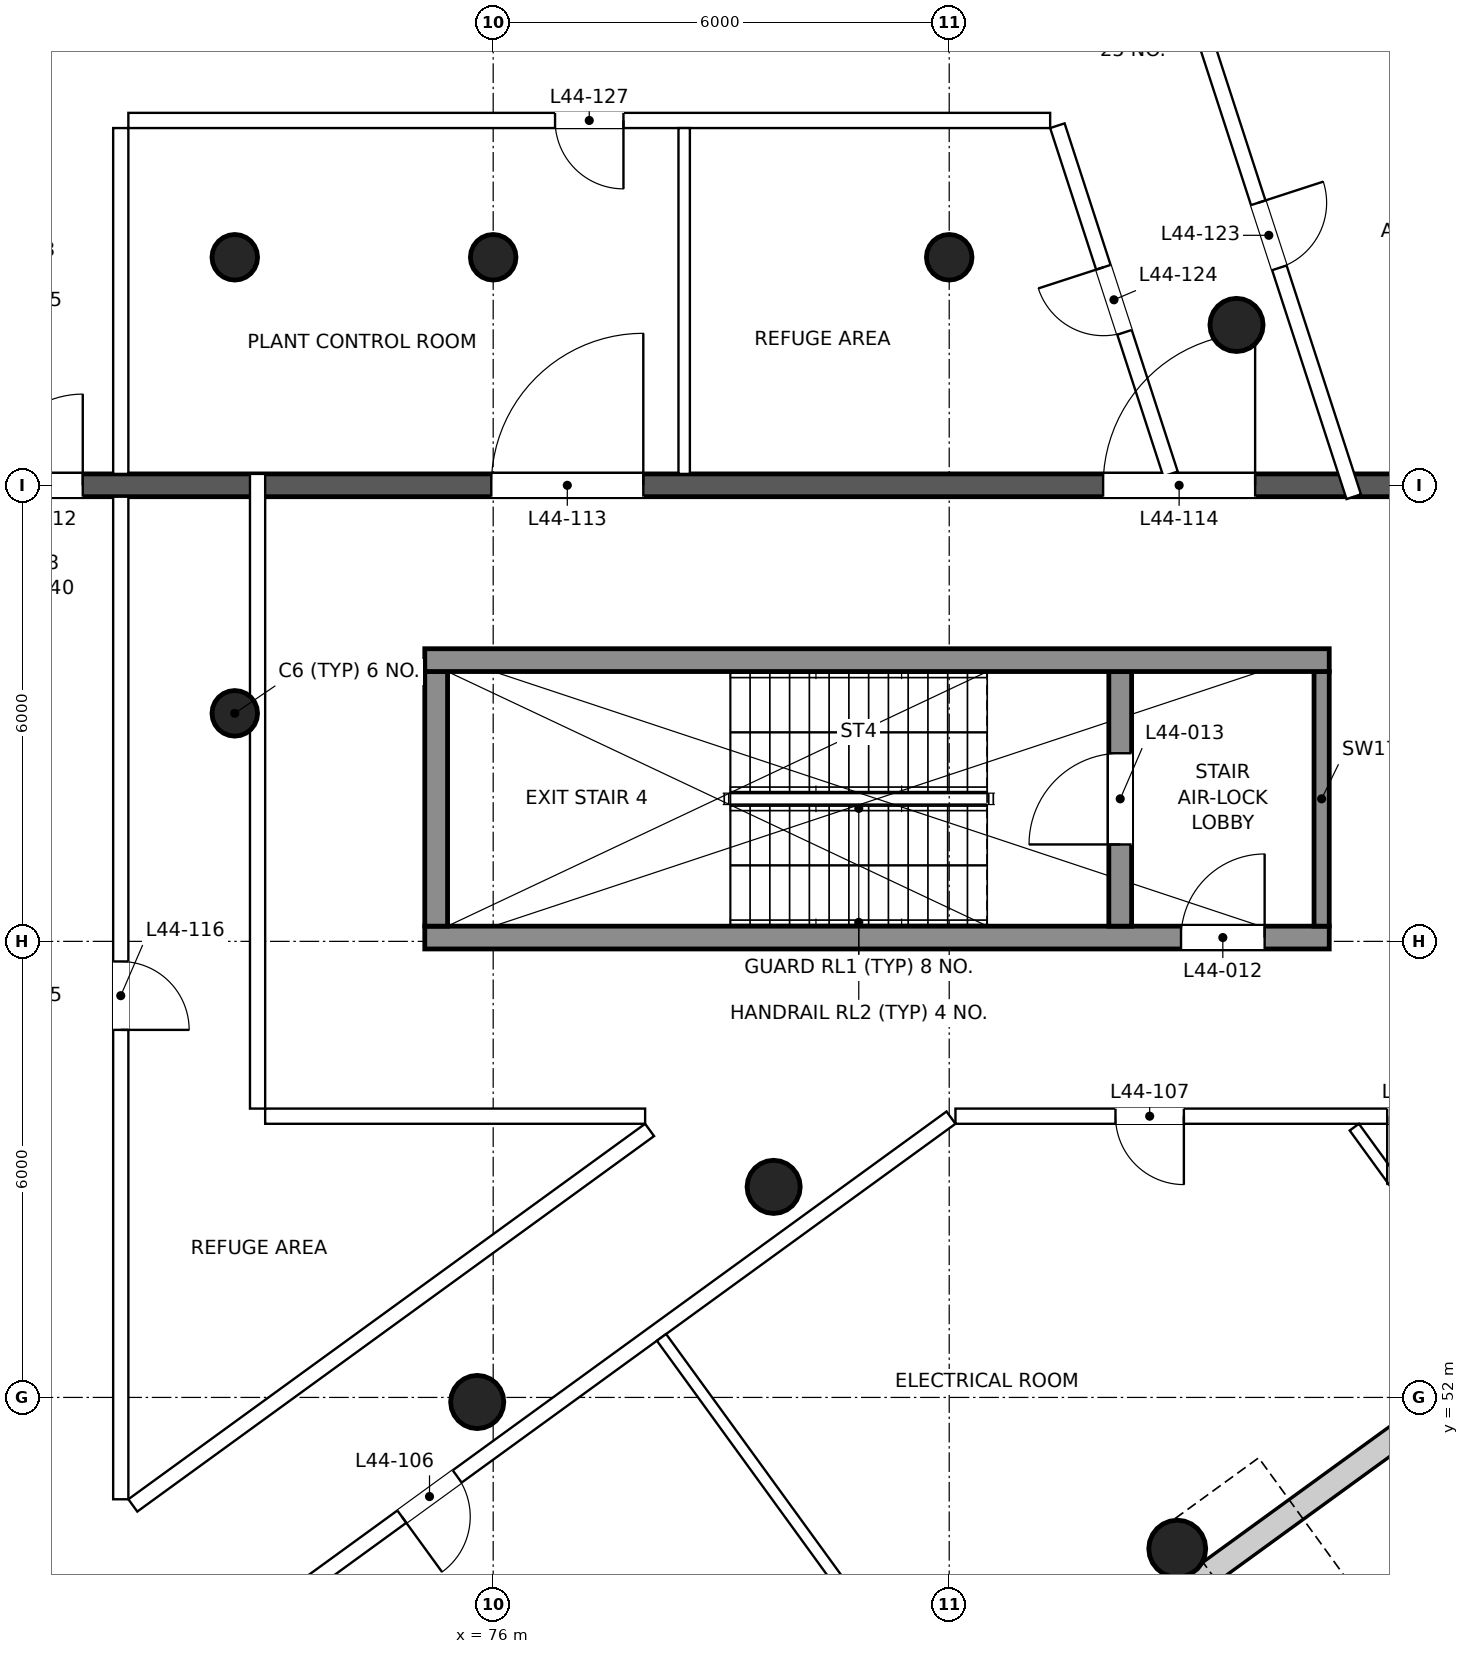
"""IFC4 building model, lengths in metres.
Left out: names, types, materials, properties, quantities, classifications, styles, units other than length and angle.
Written with IfcOpenShell. Run it as: python <this file> out.ifc"""

import sys

from ifc_helpers import new_model, si_unit, direction, frame, frame_2d, origin, origin_2d, place, context, subcontext, project, spatial, rectangle, circle, extrude, element, fill, save


model = new_model("IFC4")
c1 = context("Model", 3, precision=1e-05, world=origin(), true_north=direction((0.0, 1.0)))
c2 = subcontext(c1, "Body", "Model", "MODEL_VIEW")
j1 = project(units=[si_unit("LENGTHUNIT", "METRE"), si_unit("PLANEANGLEUNIT", "RADIAN")], contexts=[c1])
p1 = place(None, origin())
s1 = spatial("IfcSite", under=j1, at=p1, CompositionType="ELEMENT")
p2 = place(p1, origin())
s2 = spatial("IfcBuilding", under=s1, at=p2, CompositionType="ELEMENT")
p3 = place(p2, frame((0.0, 0.0, 191.5)))
s3 = spatial("IfcBuildingStorey", under=s2, at=p3, CompositionType="ELEMENT", Elevation=191.5)
p4 = place(p3, frame((85.0, 50.01, 0.0), z_axis=(0.0, 0.0, 1.0), x_axis=(1.0, 0.0, 0.0)))
e1 = element("IfcColumn", 1, at=p4, inside=s3, PredefinedType="COLUMN", context=c2, shape_type="SweptSolid", body=[
    extrude(circle(Radius=0.375, at=origin_2d()), origin(), (0.0, 0.0, 1.0), 5.0),
])
for number, where, z_axis, x_axis in (
    (2, (75.79, 51.94, 0.0), (0.0, 0.0, 1.0), (1.0, 0.0, 0.0)),
    (3, (79.69, 54.77, 0.0), (0.0, 0.0, 1.0), (1.0, 0.0, 0.0)),
    (4, (85.78, 66.11, 0.0), (0.0, 0.0, 1.0), (1.0, 0.0, 0.0)),
):
    element("IfcColumn", number, at=place(p3, frame(where, z_axis=z_axis, x_axis=x_axis)), inside=s3, PredefinedType="COLUMN", context=c2, shape_type="SweptSolid", body=[
        extrude(circle(Radius=0.35, at=origin_2d()), origin(), (0.0, 0.0, 1.0), 5.0),
    ])
for number, where, z_axis, x_axis in (
    (5, (72.6, 61.0, 0.0), (0.0, 0.0, 1.0), (1.0, 0.0, 0.0)),
    (6, (72.6, 67.0, 0.0), (0.0, 0.0, 1.0), (1.0, 0.0, 0.0)),
    (7, (76.0, 67.0, 0.0), (0.0, 0.0, 1.0), (1.0, 0.0, 0.0)),
    (8, (82.0, 67.0, 0.0), (0.0, 0.0, 1.0), (1.0, 0.0, 0.0)),
):
    element("IfcColumn", number, at=place(p3, frame(where, z_axis=z_axis, x_axis=x_axis)), inside=s3, PredefinedType="COLUMN", context=c2, shape_type="SweptSolid", body=[
        extrude(circle(Radius=0.3, at=origin_2d()), origin(), (0.0, 0.0, 1.0), 5.0),
    ])
p5 = place(p3, frame((74.391, 41.681, 0.0), z_axis=(0.0, 0.0, 1.0), x_axis=(0.809015997552, 0.5877866243, 0.0)))
e9 = element("IfcWall", 9, at=p5, inside=s3, PredefinedType="SOLIDWALL", context=c2, shape_type="SweptSolid", body=[
    extrude(rectangle(XDim=22.246, YDim=0.32, at=frame_2d((11.123, 0.0))), origin(), (0.0, 0.0, 1.0), 4.7),
])
p6 = place(p3, frame((75.1, 58.05, 0.0), z_axis=(0.0, 0.0, 1.0), x_axis=(1.0, 0.0, 0.0)))
e10 = element("IfcWall", 10, at=p6, inside=s3, PredefinedType="SHEAR", context=c2, shape_type="SweptSolid", body=[
    extrude(rectangle(XDim=11.9, YDim=0.3, at=frame_2d((5.95, 0.0))), origin(), (0.0, 0.0, 1.0), 5.0),
])
p7 = place(p6, frame((9.95, 0.0, 0.0)))
e11 = element("IfcOpeningElement", 11, at=p7, cuts=e10, PredefinedType="OPENING", context=c2, shape_type="SweptSolid", body=[
    extrude(rectangle(XDim=1.1, YDim=2.1, at=frame_2d((0.55, 1.05))), frame((0.0, 0.16, 0.0), z_axis=(0.0, -1.0, 0.0), x_axis=(1.0, 0.0, 0.0)), (0.0, 0.0, 1.0), 0.32),
])
p8 = place(p3, frame((75.25, 58.2, 0.0), z_axis=(0.0, 0.0, 1.0), x_axis=(0.0, 1.0, 0.0)))
e12 = element("IfcWall", 12, at=p8, inside=s3, PredefinedType="SHEAR", context=c2, shape_type="SweptSolid", body=[
    extrude(rectangle(XDim=3.35, YDim=0.3, at=frame_2d((1.675, 0.0))), origin(), (0.0, 0.0, 1.0), 5.0),
])
p9 = place(p3, frame((84.25, 58.2, 0.0), z_axis=(0.0, 0.0, 1.0), x_axis=(0.0, 1.0, 0.0)))
e13 = element("IfcWall", 13, at=p9, inside=s3, PredefinedType="SHEAR", context=c2, shape_type="SweptSolid", body=[
    extrude(rectangle(XDim=3.35, YDim=0.3, at=frame_2d((1.675, 0.0))), origin(), (0.0, 0.0, 1.0), 5.0),
])
p10 = place(p9, frame((1.075, 0.0, 0.0)))
e14 = element("IfcOpeningElement", 14, at=p10, cuts=e13, PredefinedType="OPENING", context=c2, shape_type="SweptSolid", body=[
    extrude(rectangle(XDim=1.2, YDim=2.1, at=frame_2d((0.6, 1.05))), frame((0.0, 0.16, 0.0), z_axis=(0.0, -1.0, 0.0), x_axis=(1.0, 0.0, 0.0)), (0.0, 0.0, 1.0), 0.32),
])
p11 = place(p3, frame((86.9, 58.2, 0.0), z_axis=(0.0, 0.0, 1.0), x_axis=(0.0, 1.0, 0.0)))
e15 = element("IfcWall", 15, at=p11, inside=s3, PredefinedType="SHEAR", context=c2, shape_type="SweptSolid", body=[
    extrude(rectangle(XDim=3.35, YDim=0.2, at=frame_2d((1.675, 0.0))), origin(), (0.0, 0.0, 1.0), 5.0),
])
p12 = place(p3, frame((75.1, 61.7, 0.0), z_axis=(0.0, 0.0, 1.0), x_axis=(1.0, 0.0, 0.0)))
e16 = element("IfcWall", 16, at=p12, inside=s3, PredefinedType="SHEAR", context=c2, shape_type="SweptSolid", body=[
    extrude(rectangle(XDim=11.9, YDim=0.3, at=frame_2d((5.95, 0.0))), origin(), (0.0, 0.0, 1.0), 5.0),
])
p13 = place(p3, frame((45.703, 64.0, 0.0), z_axis=(0.0, 0.0, 1.0), x_axis=(1.0, 0.0, 0.0)))
e17 = element("IfcWall", 17, at=p13, inside=s3, PredefinedType="PARTITIONING", context=c2, shape_type="SweptSolid", body=[
    extrude(rectangle(XDim=48.595, YDim=0.3, at=frame_2d((24.297, 0.0))), origin(), (0.0, 0.0, 1.0), 3.7),
])
p14 = place(p13, frame((8.272, 0.0, 0.0)))
e18 = element("IfcOpeningElement", 18, at=p14, cuts=e17, PredefinedType="OPENING", context=c2, shape_type="SweptSolid", body=[
    extrude(rectangle(XDim=2.0, YDim=2.1, at=frame_2d((1.0, 1.05))), frame((0.0, 0.16, 0.0), z_axis=(0.0, -1.0, 0.0), x_axis=(1.0, 0.0, 0.0)), (0.0, 0.0, 1.0), 0.32),
])
p15 = place(p13, frame((16.322, 0.0, 0.0)))
e19 = element("IfcOpeningElement", 19, at=p15, cuts=e17, PredefinedType="OPENING", context=c2, shape_type="SweptSolid", body=[
    extrude(rectangle(XDim=2.0, YDim=2.1, at=frame_2d((1.0, 1.05))), frame((0.0, 0.16, 0.0), z_axis=(0.0, -1.0, 0.0), x_axis=(1.0, 0.0, 0.0)), (0.0, 0.0, 1.0), 0.32),
])
p16 = place(p13, frame((23.697, 0.0, 0.0)))
e20 = element("IfcOpeningElement", 20, at=p16, cuts=e17, PredefinedType="OPENING", context=c2, shape_type="SweptSolid", body=[
    extrude(rectangle(XDim=1.2, YDim=2.1, at=frame_2d((0.6, 1.05))), frame((0.0, 0.16, 0.0), z_axis=(0.0, -1.0, 0.0), x_axis=(1.0, 0.0, 0.0)), (0.0, 0.0, 1.0), 0.32),
])
p17 = place(p13, frame((30.272, 0.0, 0.0)))
e21 = element("IfcOpeningElement", 21, at=p17, cuts=e17, PredefinedType="OPENING", context=c2, shape_type="SweptSolid", body=[
    extrude(rectangle(XDim=2.0, YDim=2.1, at=frame_2d((1.0, 1.05))), frame((0.0, 0.16, 0.0), z_axis=(0.0, -1.0, 0.0), x_axis=(1.0, 0.0, 0.0)), (0.0, 0.0, 1.0), 0.32),
])
p18 = place(p13, frame((38.322, 0.0, 0.0)))
e22 = element("IfcOpeningElement", 22, at=p18, cuts=e17, PredefinedType="OPENING", context=c2, shape_type="SweptSolid", body=[
    extrude(rectangle(XDim=2.0, YDim=2.1, at=frame_2d((1.0, 1.05))), frame((0.0, 0.16, 0.0), z_axis=(0.0, -1.0, 0.0), x_axis=(1.0, 0.0, 0.0)), (0.0, 0.0, 1.0), 0.32),
])
p19 = place(p3, frame((83.205, 76.522, 0.0), z_axis=(0.0, 0.0, 1.0), x_axis=(0.309023094896, -0.951054534094, 0.0)))
e23 = element("IfcWall", 23, at=p19, inside=s3, PredefinedType="PARTITIONING", context=c2, shape_type="SweptSolid", body=[
    extrude(rectangle(XDim=13.324, YDim=0.2, at=frame_2d((6.662, 0.0))), origin(), (0.0, 0.0, 1.0), 3.7),
])
p20 = place(p19, frame((9.258, 0.0, 0.0)))
e24 = element("IfcOpeningElement", 24, at=p20, cuts=e23, PredefinedType="OPENING", context=c2, shape_type="SweptSolid", body=[
    extrude(rectangle(XDim=0.9, YDim=2.1, at=frame_2d((0.45, 1.05))), frame((0.0, 0.11, 0.0), z_axis=(0.0, -1.0, 0.0), x_axis=(1.0, 0.0, 0.0)), (0.0, 0.0, 1.0), 0.22),
])
p21 = place(p3, frame((89.1, 55.7, 0.0), z_axis=(0.0, 0.0, 1.0), x_axis=(-1.0, 0.0, 0.0)))
e25 = element("IfcWall", 25, at=p21, inside=s3, PredefinedType="PARTITIONING", context=c2, shape_type="SweptSolid", body=[
    extrude(rectangle(XDim=7.018, YDim=0.2, at=frame_2d((3.509, 0.0))), origin(), (0.0, 0.0, 1.0), 4.0),
])
p22 = place(p21, frame((4.013, 0.0, 0.0)))
e26 = element("IfcOpeningElement", 26, at=p22, cuts=e25, PredefinedType="OPENING", context=c2, shape_type="SweptSolid", body=[
    extrude(rectangle(XDim=0.9, YDim=2.1, at=frame_2d((0.45, 1.05))), frame((0.0, 0.11, 0.0), z_axis=(0.0, -1.0, 0.0), x_axis=(1.0, 0.0, 0.0)), (0.0, 0.0, 1.0), 0.22),
])
p23 = place(p21, frame((0.438, 0.0, 0.0)))
e27 = element("IfcOpeningElement", 27, at=p23, cuts=e25, PredefinedType="OPENING", context=c2, shape_type="SweptSolid", body=[
    extrude(rectangle(XDim=0.9, YDim=2.1, at=frame_2d((0.45, 1.05))), frame((0.0, 0.11, 0.0), z_axis=(0.0, -1.0, 0.0), x_axis=(1.0, 0.0, 0.0)), (0.0, 0.0, 1.0), 0.22),
])
p24 = place(p3, frame((82.023, 55.681, 0.0), z_axis=(0.0, 0.0, 1.0), x_axis=(-0.809021032416, -0.587779694366, 0.0)))
e28 = element("IfcWall", 28, at=p24, inside=s3, PredefinedType="PARTITIONING", context=c2, shape_type="SweptSolid", body=[
    extrude(rectangle(XDim=12.148, YDim=0.2, at=frame_2d((6.074, 0.0))), origin(), (0.0, 0.0, 1.0), 3.7),
])
p25 = place(p24, frame((8.031, 0.0, 0.0)))
e29 = element("IfcOpeningElement", 29, at=p25, cuts=e28, PredefinedType="OPENING", context=c2, shape_type="SweptSolid", body=[
    extrude(rectangle(XDim=0.9, YDim=2.1, at=frame_2d((0.45, 1.05))), frame((0.0, 0.11, 0.0), z_axis=(0.0, -1.0, 0.0), x_axis=(1.0, 0.0, 0.0)), (0.0, 0.0, 1.0), 0.22),
])
p26 = place(p3, frame((84.912, 64.15, 0.0), z_axis=(0.0, 0.0, 1.0), x_axis=(-0.309026476021, 0.951053435469, 0.0)))
e30 = element("IfcWall", 30, at=p26, inside=s3, PredefinedType="PARTITIONING", context=c2, shape_type="SweptSolid", body=[
    extrude(rectangle(XDim=4.817, YDim=0.2, at=frame_2d((2.408, 0.0))), origin(), (0.0, 0.0, 1.0), 3.7),
])
p27 = place(p26, frame((1.958, 0.0, 0.0)))
e31 = element("IfcOpeningElement", 31, at=p27, cuts=e30, PredefinedType="OPENING", context=c2, shape_type="SweptSolid", body=[
    extrude(rectangle(XDim=0.9, YDim=2.1, at=frame_2d((0.45, 1.05))), frame((0.0, 0.11, 0.0), z_axis=(0.0, -1.0, 0.0), x_axis=(1.0, 0.0, 0.0)), (0.0, 0.0, 1.0), 0.22),
])
p28 = place(p3, frame((83.328, 68.8, 0.0), z_axis=(0.0, 0.0, 1.0), x_axis=(-1.0, 0.0, 0.0)))
e32 = element("IfcWall", 32, at=p28, inside=s3, PredefinedType="PARTITIONING", context=c2, shape_type="SweptSolid", body=[
    extrude(rectangle(XDim=12.128, YDim=0.2, at=frame_2d((6.064, 0.0))), origin(), (0.0, 0.0, 1.0), 4.7),
])
p29 = place(p28, frame((5.614, 0.0, 0.0)))
e33 = element("IfcOpeningElement", 33, at=p29, cuts=e32, PredefinedType="OPENING", context=c2, shape_type="SweptSolid", body=[
    extrude(rectangle(XDim=0.9, YDim=2.1, at=frame_2d((0.45, 1.05))), frame((0.0, 0.11, 0.0), z_axis=(0.0, -1.0, 0.0), x_axis=(1.0, 0.0, 0.0)), (0.0, 0.0, 1.0), 0.22),
])
p30 = place(p3, frame((71.1, 68.7, 0.0), z_axis=(0.0, 0.0, 1.0), x_axis=(0.0, -1.0, 0.0)))
e34 = element("IfcWall", 34, at=p30, inside=s3, PredefinedType="PARTITIONING", context=c2, shape_type="SweptSolid", body=[
    extrude(rectangle(XDim=4.55, YDim=0.2, at=frame_2d((2.275, 0.0))), origin(), (0.0, 0.0, 1.0), 4.7),
])
p31 = place(p3, frame((71.1, 63.85, 0.0), z_axis=(0.0, 0.0, 1.0), x_axis=(0.0, -1.0, 0.0)))
e35 = element("IfcWall", 35, at=p31, inside=s3, PredefinedType="PARTITIONING", context=c2, shape_type="SweptSolid", body=[
    extrude(rectangle(XDim=13.19, YDim=0.2, at=frame_2d((6.595, 0.0))), origin(), (0.0, 0.0, 1.0), 3.7),
])
p32 = place(p31, frame((6.115, 0.0, 0.0)))
e36 = element("IfcOpeningElement", 36, at=p32, cuts=e35, PredefinedType="OPENING", context=c2, shape_type="SweptSolid", body=[
    extrude(rectangle(XDim=0.9, YDim=2.1, at=frame_2d((0.45, 1.05))), frame((0.0, 0.11, 0.0), z_axis=(0.0, -1.0, 0.0), x_axis=(1.0, 0.0, 0.0)), (0.0, 0.0, 1.0), 0.22),
])
p33 = place(p3, frame((71.259, 50.579, 0.0), z_axis=(0.0, 0.0, 1.0), x_axis=(0.809023664715, 0.587776071248, 0.0)))
e37 = element("IfcWall", 37, at=p33, inside=s3, PredefinedType="PARTITIONING", context=c2, shape_type="SweptSolid", body=[
    extrude(rectangle(XDim=8.404, YDim=0.2, at=frame_2d((4.202, 0.0))), origin(), (0.0, 0.0, 1.0), 3.7),
])
p34 = place(p3, frame((77.999, 55.7, 0.0), z_axis=(0.0, 0.0, 1.0), x_axis=(-1.0, 0.0, 0.0)))
e38 = element("IfcWall", 38, at=p34, inside=s3, PredefinedType="PARTITIONING", context=c2, shape_type="SweptSolid", body=[
    extrude(rectangle(XDim=4.999, YDim=0.2, at=frame_2d((2.5, 0.0))), origin(), (0.0, 0.0, 1.0), 3.7),
])
p35 = place(p3, frame((72.9, 55.8, 0.0), z_axis=(0.0, 0.0, 1.0), x_axis=(0.0, 1.0, 0.0)))
e39 = element("IfcWall", 39, at=p35, inside=s3, PredefinedType="PARTITIONING", context=c2, shape_type="SweptSolid", body=[
    extrude(rectangle(XDim=8.35, YDim=0.2, at=frame_2d((4.175, 0.0))), origin(), (0.0, 0.0, 1.0), 3.7),
])
p36 = place(p3, frame((82.082, 47.467, 0.0), z_axis=(0.0, 0.0, 1.0), x_axis=(-0.587796586364, 0.809008759569, 0.0)))
e40 = element("IfcWall", 40, at=p36, inside=s3, PredefinedType="PARTITIONING", context=c2, shape_type="SweptSolid", body=[
    extrude(rectangle(XDim=6.58, YDim=0.15, at=frame_2d((3.29, 0.0))), origin(), (0.0, 0.0, 1.0), 4.7),
])
p37 = place(p3, frame((89.363, 52.757, 0.0), z_axis=(0.0, 0.0, 1.0), x_axis=(-0.587760469668, 0.809034999426, 0.0)))
e41 = element("IfcWall", 41, at=p37, inside=s3, PredefinedType="PARTITIONING", context=c2, shape_type="SweptSolid", body=[
    extrude(rectangle(XDim=3.46, YDim=0.15, at=frame_2d((1.73, 0.0))), origin(), (0.0, 0.0, 1.0), 4.0),
])
p38 = place(p3, frame((78.513, 64.15, 0.0), z_axis=(0.0, 0.0, 1.0), x_axis=(0.0, 1.0, 0.0)))
e42 = element("IfcWall", 42, at=p38, inside=s3, PredefinedType="PARTITIONING", context=c2, shape_type="SweptSolid", body=[
    extrude(rectangle(XDim=4.55, YDim=0.15, at=frame_2d((2.275, 0.0))), origin(), (0.0, 0.0, 1.0), 4.7),
])
p39 = place(p7, origin())
e43 = element("IfcDoor", 43, at=p39, inside=s3, OperationType="SINGLE_SWING_RIGHT", PredefinedType="DOOR", context=c2, shape_type="SweptSolid", body=[
    extrude(rectangle(XDim=1.1, YDim=2.1, at=frame_2d((0.55, 1.05))), frame((0.0, 0.025, 0.0), z_axis=(0.0, -1.0, 0.0), x_axis=(1.0, 0.0, 0.0)), (0.0, 0.0, 1.0), 0.05),
])
fill(e11, e43)
p40 = place(p10, origin())
e44 = element("IfcDoor", 44, at=p40, inside=s3, OperationType="SINGLE_SWING_LEFT", PredefinedType="DOOR", context=c2, shape_type="SweptSolid", body=[
    extrude(rectangle(XDim=1.2, YDim=2.1, at=frame_2d((0.6, 1.05))), frame((0.0, 0.025, 0.0), z_axis=(0.0, -1.0, 0.0), x_axis=(1.0, 0.0, 0.0)), (0.0, 0.0, 1.0), 0.05),
])
fill(e14, e44)
p41 = place(p25, origin())
e45 = element("IfcDoor", 45, at=p41, inside=s3, OperationType="SINGLE_SWING_RIGHT", PredefinedType="DOOR", context=c2, shape_type="SweptSolid", body=[
    extrude(rectangle(XDim=0.9, YDim=2.1, at=frame_2d((0.45, 1.05))), frame((0.0, 0.025, 0.0), z_axis=(0.0, -1.0, 0.0), x_axis=(1.0, 0.0, 0.0)), (0.0, 0.0, 1.0), 0.05),
])
fill(e29, e45)
p42 = place(p22, origin())
e46 = element("IfcDoor", 46, at=p42, inside=s3, OperationType="SINGLE_SWING_LEFT", PredefinedType="DOOR", context=c2, shape_type="SweptSolid", body=[
    extrude(rectangle(XDim=0.9, YDim=2.1, at=frame_2d((0.45, 1.05))), frame((0.0, 0.025, 0.0), z_axis=(0.0, -1.0, 0.0), x_axis=(1.0, 0.0, 0.0)), (0.0, 0.0, 1.0), 0.05),
])
fill(e26, e46)
p43 = place(p23, origin())
e47 = element("IfcDoor", 47, at=p43, inside=s3, OperationType="SINGLE_SWING_RIGHT", PredefinedType="DOOR", context=c2, shape_type="SweptSolid", body=[
    extrude(rectangle(XDim=0.9, YDim=2.1, at=frame_2d((0.45, 1.05))), frame((0.0, 0.025, 0.0), z_axis=(0.0, -1.0, 0.0), x_axis=(1.0, 0.0, 0.0)), (0.0, 0.0, 1.0), 0.05),
])
fill(e27, e47)
p44 = place(p16, origin())
e48 = element("IfcDoor", 48, at=p44, inside=s3, OperationType="SINGLE_SWING_RIGHT", PredefinedType="DOOR", context=c2, shape_type="SweptSolid", body=[
    extrude(rectangle(XDim=1.2, YDim=2.1, at=frame_2d((0.6, 1.05))), frame((0.0, 0.025, 0.0), z_axis=(0.0, -1.0, 0.0), x_axis=(1.0, 0.0, 0.0)), (0.0, 0.0, 1.0), 0.05),
])
fill(e20, e48)
p45 = place(p17, origin())
e49 = element("IfcDoor", 49, at=p45, inside=s3, OperationType="DOUBLE_DOOR_SINGLE_SWING", PredefinedType="DOOR", context=c2, shape_type="SweptSolid", body=[
    extrude(rectangle(XDim=2.0, YDim=2.1, at=frame_2d((1.0, 1.05))), frame((0.0, 0.025, 0.0), z_axis=(0.0, -1.0, 0.0), x_axis=(1.0, 0.0, 0.0)), (0.0, 0.0, 1.0), 0.05),
])
fill(e21, e49)
p46 = place(p18, origin())
e50 = element("IfcDoor", 50, at=p46, inside=s3, OperationType="DOUBLE_DOOR_SINGLE_SWING", PredefinedType="DOOR", context=c2, shape_type="SweptSolid", body=[
    extrude(rectangle(XDim=2.0, YDim=2.1, at=frame_2d((1.0, 1.05))), frame((0.0, 0.025, 0.0), z_axis=(0.0, -1.0, 0.0), x_axis=(1.0, 0.0, 0.0)), (0.0, 0.0, 1.0), 0.05),
])
fill(e22, e50)
p47 = place(p32, origin())
e51 = element("IfcDoor", 51, at=p47, inside=s3, OperationType="SINGLE_SWING_RIGHT", PredefinedType="DOOR", context=c2, shape_type="SweptSolid", body=[
    extrude(rectangle(XDim=0.9, YDim=2.1, at=frame_2d((0.45, 1.05))), frame((0.0, 0.025, 0.0), z_axis=(0.0, -1.0, 0.0), x_axis=(1.0, 0.0, 0.0)), (0.0, 0.0, 1.0), 0.05),
])
fill(e36, e51)
p48 = place(p20, origin())
e52 = element("IfcDoor", 52, at=p48, inside=s3, OperationType="SINGLE_SWING_LEFT", PredefinedType="DOOR", context=c2, shape_type="SweptSolid", body=[
    extrude(rectangle(XDim=0.9, YDim=2.1, at=frame_2d((0.45, 1.05))), frame((0.0, 0.025, 0.0), z_axis=(0.0, -1.0, 0.0), x_axis=(1.0, 0.0, 0.0)), (0.0, 0.0, 1.0), 0.05),
])
fill(e24, e52)
p49 = place(p27, origin())
e53 = element("IfcDoor", 53, at=p49, inside=s3, OperationType="SINGLE_SWING_RIGHT", PredefinedType="DOOR", context=c2, shape_type="SweptSolid", body=[
    extrude(rectangle(XDim=0.9, YDim=2.1, at=frame_2d((0.45, 1.05))), frame((0.0, 0.025, 0.0), z_axis=(0.0, -1.0, 0.0), x_axis=(1.0, 0.0, 0.0)), (0.0, 0.0, 1.0), 0.05),
])
fill(e31, e53)
p50 = place(p29, origin())
e54 = element("IfcDoor", 54, at=p50, inside=s3, OperationType="SINGLE_SWING_LEFT", PredefinedType="DOOR", context=c2, shape_type="SweptSolid", body=[
    extrude(rectangle(XDim=0.9, YDim=2.1, at=frame_2d((0.45, 1.05))), frame((0.0, 0.025, 0.0), z_axis=(0.0, -1.0, 0.0), x_axis=(1.0, 0.0, 0.0)), (0.0, 0.0, 1.0), 0.05),
])
fill(e33, e54)
save(model, sys.argv[1])
